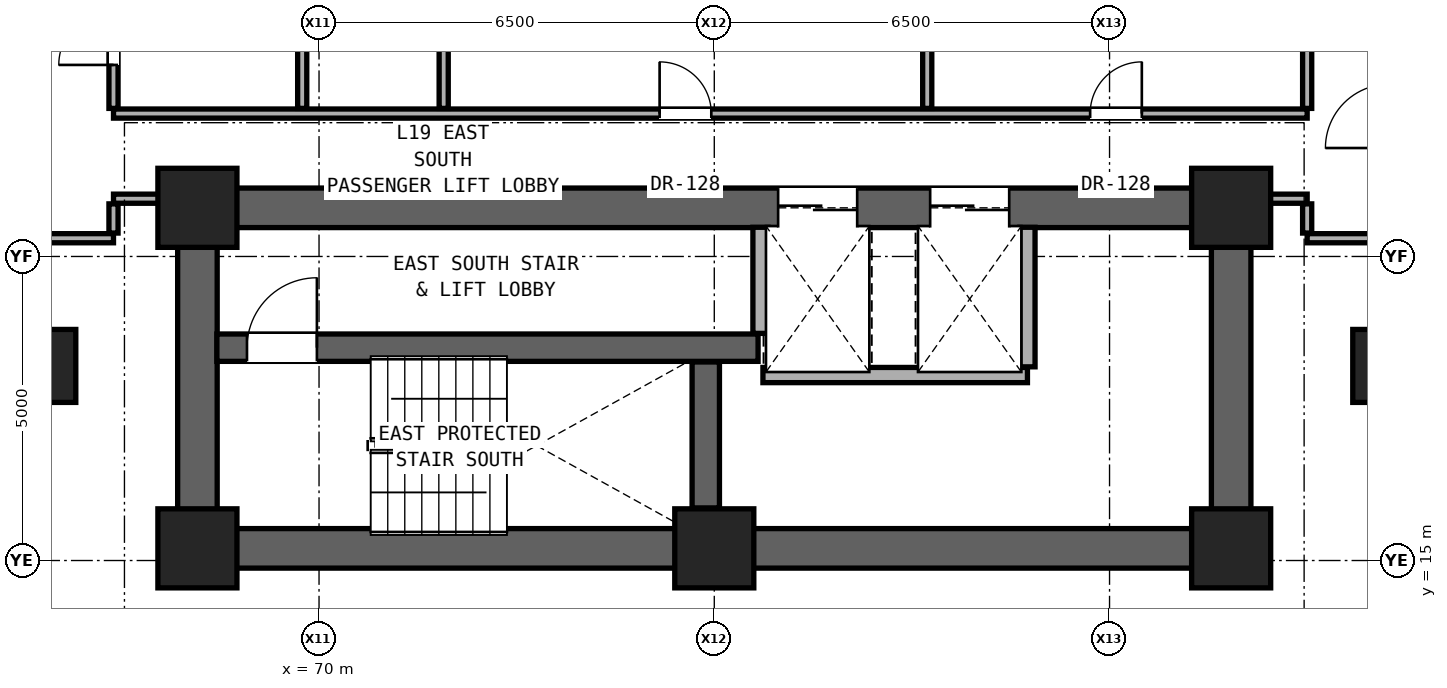
"""IFC4 building model, lengths in metres.
Left out: names, types, materials, properties, quantities, classifications, styles, units other than length and angle.
Written with IfcOpenShell. Run it as: python <this file> out.ifc"""

import sys

from ifc_helpers import new_model, si_unit, direction, frame, frame_2d, origin, origin_2d, place, context, subcontext, project, spatial, rectangle, extrude, element, fill, save


model = new_model("IFC4")
c1 = context("Model", 3, precision=1e-05, world=origin(), true_north=direction((0.0, 1.0)))
c2 = subcontext(c1, "Body", "Model", "MODEL_VIEW")
j1 = project(units=[si_unit("LENGTHUNIT", "METRE"), si_unit("PLANEANGLEUNIT", "RADIAN")], contexts=[c1])
p1 = place(None, origin())
s1 = spatial("IfcSite", under=j1, at=p1, CompositionType="ELEMENT")
p2 = place(p1, origin())
s2 = spatial("IfcBuilding", under=s1, at=p2, CompositionType="ELEMENT")
p3 = place(p2, frame((0.0, 0.0, 68.6)))
s3 = spatial("IfcBuildingStorey", under=s2, at=p3, CompositionType="ELEMENT", Elevation=68.6)
for number, where, z_axis, x_axis in (
    (1, (68.0, 15.2, 0.0), (0.0, 0.0, 1.0), (1.0, 0.0, 0.0)),
    (2, (76.5, 15.2, 0.0), (0.0, 0.0, 1.0), (1.0, 0.0, 0.0)),
    (3, (85.0, 15.2, 0.0), (0.0, 0.0, 1.0), (1.0, 0.0, 0.0)),
    (4, (68.0, 20.8, 0.0), (0.0, 0.0, 1.0), (1.0, 0.0, 0.0)),
    (5, (85.0, 20.8, 0.0), (0.0, 0.0, 1.0), (1.0, 0.0, 0.0)),
):
    element("IfcColumn", number, at=place(p3, frame(where, z_axis=z_axis, x_axis=x_axis)), inside=s3, PredefinedType="COLUMN", context=c2, shape_type="SweptSolid", body=[
        extrude(rectangle(XDim=1.3, YDim=1.3, at=origin_2d()), origin(), (0.0, 0.0, 1.0), 3.3),
    ])
for number, where, z_axis, x_axis in (
    (6, (65.6, 18.2, 0.0), (0.0, 0.0, 1.0), (1.0, 0.0, 0.0)),
    (7, (87.4, 18.2, 0.0), (0.0, 0.0, 1.0), (1.0, 0.0, 0.0)),
):
    element("IfcColumn", number, at=place(p3, frame(where, z_axis=z_axis, x_axis=x_axis)), inside=s3, PredefinedType="PILASTER", context=c2, shape_type="SweptSolid", body=[
        extrude(rectangle(XDim=0.8, YDim=1.2, at=origin_2d()), origin(), (0.0, 0.0, 1.0), 3.3),
    ])
p4 = place(p3, frame((68.0, 15.2, 0.0), z_axis=(0.0, 0.0, 1.0), x_axis=(1.0, 0.0, 0.0)))
e8 = element("IfcWall", 8, at=p4, inside=s3, PredefinedType="SHEAR", context=c2, shape_type="SweptSolid", body=[
    extrude(rectangle(XDim=17.0, YDim=0.65, at=frame_2d((8.5, 0.0))), origin(), (0.0, 0.0, 1.0), 3.06),
])
for number, where, z_axis, x_axis in (
    (9, (68.0, 15.2, 0.0), (0.0, 0.0, 1.0), (0.0, 1.0, 0.0)),
    (10, (85.0, 15.2, 0.0), (0.0, 0.0, 1.0), (0.0, 1.0, 0.0)),
):
    element("IfcWall", number, at=place(p3, frame(where, z_axis=z_axis, x_axis=x_axis)), inside=s3, PredefinedType="SHEAR", context=c2, shape_type="SweptSolid", body=[
        extrude(rectangle(XDim=5.6, YDim=0.65, at=frame_2d((2.8, 0.0))), origin(), (0.0, 0.0, 1.0), 3.06),
    ])
p5 = place(p3, frame((68.0, 20.8, 0.0), z_axis=(0.0, 0.0, 1.0), x_axis=(1.0, 0.0, 0.0)))
e11 = element("IfcWall", 11, at=p5, inside=s3, PredefinedType="SHEAR", context=c2, shape_type="SweptSolid", body=[
    extrude(rectangle(XDim=17.0, YDim=0.65, at=frame_2d((8.5, 0.0))), origin(), (0.0, 0.0, 1.0), 3.06),
])
p6 = place(p5, frame((9.55, 0.0, 0.0)))
e12 = element("IfcOpeningElement", 12, at=p6, cuts=e11, PredefinedType="OPENING", context=c2, shape_type="SweptSolid", body=[
    extrude(rectangle(XDim=1.3, YDim=2.3, at=frame_2d((0.65, 1.15))), frame((0.0, 0.335, 0.0), z_axis=(0.0, -1.0, 0.0), x_axis=(1.0, 0.0, 0.0)), (0.0, 0.0, 1.0), 0.67),
])
p7 = place(p5, frame((12.05, 0.0, 0.0)))
e13 = element("IfcOpeningElement", 13, at=p7, cuts=e11, PredefinedType="OPENING", context=c2, shape_type="SweptSolid", body=[
    extrude(rectangle(XDim=1.3, YDim=2.3, at=frame_2d((0.65, 1.15))), frame((0.0, 0.335, 0.0), z_axis=(0.0, -1.0, 0.0), x_axis=(1.0, 0.0, 0.0)), (0.0, 0.0, 1.0), 0.67),
])
p8 = place(p3, frame((77.3, 18.05, 0.0), z_axis=(0.0, 0.0, 1.0), x_axis=(1.0, 0.0, 0.0)))
e14 = element("IfcWall", 14, at=p8, inside=s3, PredefinedType="SOLIDWALL", context=c2, shape_type="SweptSolid", body=[
    extrude(rectangle(XDim=4.35, YDim=0.25, at=frame_2d((2.175, 0.0))), origin(), (0.0, 0.0, 1.0), 3.06),
])
p9 = place(p3, frame((68.32, 18.5, 0.0), z_axis=(0.0, 0.0, 1.0), x_axis=(1.0, 0.0, 0.0)))
e15 = element("IfcWall", 15, at=p9, inside=s3, PredefinedType="SHEAR", context=c2, shape_type="SweptSolid", body=[
    extrude(rectangle(XDim=8.9, YDim=0.45, at=frame_2d((4.45, 0.0))), origin(), (0.0, 0.0, 1.0), 3.06),
])
p10 = place(p9, frame((0.495, 0.0, 0.0)))
e16 = element("IfcOpeningElement", 16, at=p10, cuts=e15, PredefinedType="OPENING", context=c2, shape_type="SweptSolid", body=[
    extrude(rectangle(XDim=1.15, YDim=2.2, at=frame_2d((0.575, 1.1))), frame((0.0, 0.235, 0.0), z_axis=(0.0, -1.0, 0.0), x_axis=(1.0, 0.0, 0.0)), (0.0, 0.0, 1.0), 0.47),
])
p11 = place(p3, frame((65.25, 20.3, 0.0), z_axis=(0.0, 0.0, 1.0), x_axis=(1.0, 0.0, 0.0)))
e17 = element("IfcWall", 17, at=p11, inside=s3, PredefinedType="PARTITIONING", context=c2, shape_type="SweptSolid", body=[
    extrude(rectangle(XDim=1.37, YDim=0.15, at=frame_2d((0.685, 0.0))), origin(), (0.0, 0.0, 1.0), 3.06),
])
p12 = place(p3, frame((86.25, 20.3, 0.0), z_axis=(0.0, 0.0, 1.0), x_axis=(1.0, 0.0, 0.0)))
e18 = element("IfcWall", 18, at=p12, inside=s3, PredefinedType="PARTITIONING", context=c2, shape_type="SweptSolid", body=[
    extrude(rectangle(XDim=1.35, YDim=0.15, at=frame_2d((0.675, 0.0))), origin(), (0.0, 0.0, 1.0), 3.06),
])
p13 = place(p3, frame((66.62, 20.95, 0.0), z_axis=(0.0, 0.0, 1.0), x_axis=(1.0, 0.0, 0.0)))
e19 = element("IfcWall", 19, at=p13, inside=s3, PredefinedType="PARTITIONING", context=c2, shape_type="SweptSolid", body=[
    extrude(rectangle(XDim=1.06, YDim=0.15, at=frame_2d((0.53, 0.0))), origin(), (0.0, 0.0, 1.0), 2.452),
])
p14 = place(p3, frame((85.32, 20.95, 0.0), z_axis=(0.0, 0.0, 1.0), x_axis=(1.0, 0.0, 0.0)))
e20 = element("IfcWall", 20, at=p14, inside=s3, PredefinedType="PARTITIONING", context=c2, shape_type="SweptSolid", body=[
    extrude(rectangle(XDim=0.93, YDim=0.15, at=frame_2d((0.465, 0.0))), origin(), (0.0, 0.0, 1.0), 2.452),
])
p15 = place(p3, frame((66.62, 22.35, 0.0), z_axis=(0.0, 0.0, 1.0), x_axis=(1.0, 0.0, 0.0)))
e21 = element("IfcWall", 21, at=p15, inside=s3, PredefinedType="PARTITIONING", context=c2, shape_type="SweptSolid", body=[
    extrude(rectangle(XDim=19.63, YDim=0.15, at=frame_2d((9.815, 0.0))), origin(), (0.0, 0.0, 1.0), 2.125),
])
p16 = place(p15, frame((8.981, 0.0, 0.0)))
e22 = element("IfcOpeningElement", 22, at=p16, cuts=e21, PredefinedType="OPENING", context=c2, shape_type="SweptSolid", body=[
    extrude(rectangle(XDim=0.85, YDim=2.01, at=frame_2d((0.425, 1.005))), frame((0.0, 0.085, 0.0), z_axis=(0.0, -1.0, 0.0), x_axis=(1.0, 0.0, 0.0)), (0.0, 0.0, 1.0), 0.17),
])
p17 = place(p15, frame((16.061, 0.0, 0.0)))
e23 = element("IfcOpeningElement", 23, at=p17, cuts=e21, PredefinedType="OPENING", context=c2, shape_type="SweptSolid", body=[
    extrude(rectangle(XDim=0.85, YDim=2.01, at=frame_2d((0.425, 1.005))), frame((0.0, 0.085, 0.0), z_axis=(0.0, -1.0, 0.0), x_axis=(1.0, 0.0, 0.0)), (0.0, 0.0, 1.0), 0.17),
])
p18 = place(p3, frame((66.62, 20.385, 0.0), z_axis=(0.0, 0.0, 1.0), x_axis=(0.0, 1.0, 0.0)))
e24 = element("IfcWall", 24, at=p18, inside=s3, PredefinedType="PARTITIONING", context=c2, shape_type="SweptSolid", body=[
    extrude(rectangle(XDim=0.48, YDim=0.15, at=frame_2d((0.24, 0.0))), origin(), (0.0, 0.0, 1.0), 2.452),
])
p19 = place(p3, frame((66.62, 22.435, 0.0), z_axis=(0.0, 0.0, 1.0), x_axis=(0.0, 1.0, 0.0)))
e25 = element("IfcWall", 25, at=p19, inside=s3, PredefinedType="PARTITIONING", context=c2, shape_type="SweptSolid", body=[
    extrude(rectangle(XDim=2.33, YDim=0.15, at=frame_2d((1.165, 0.0))), origin(), (0.0, 0.0, 1.0), 3.06),
])
p20 = place(p19, frame((0.715, 0.0, 0.0)))
e26 = element("IfcOpeningElement", 26, at=p20, cuts=e25, PredefinedType="OPENING", context=c2, shape_type="SweptSolid", body=[
    extrude(rectangle(XDim=0.9, YDim=2.1, at=frame_2d((0.45, 1.05))), frame((0.0, 0.085, 0.0), z_axis=(0.0, -1.0, 0.0), x_axis=(1.0, 0.0, 0.0)), (0.0, 0.0, 1.0), 0.17),
])
p21 = place(p3, frame((69.723, 22.435, 0.0), z_axis=(0.0, 0.0, 1.0), x_axis=(0.0, 1.0, 0.0)))
e27 = element("IfcWall", 27, at=p21, inside=s3, PredefinedType="PARTITIONING", context=c2, shape_type="SweptSolid", body=[
    extrude(rectangle(XDim=2.33, YDim=0.15, at=frame_2d((1.165, 0.0))), origin(), (0.0, 0.0, 1.0), 3.06),
])
p22 = place(p3, frame((72.05, 22.435, 0.0), z_axis=(0.0, 0.0, 1.0), x_axis=(0.0, 1.0, 0.0)))
e28 = element("IfcWall", 28, at=p22, inside=s3, PredefinedType="PARTITIONING", context=c2, shape_type="SweptSolid", body=[
    extrude(rectangle(XDim=3.565, YDim=0.15, at=frame_2d((1.782, 0.0))), origin(), (0.0, 0.0, 1.0), 2.589),
])
p23 = place(p3, frame((76.36, 15.865, 0.0), z_axis=(0.0, 0.0, 1.0), x_axis=(0.0, 1.0, 0.0)))
e29 = element("IfcWall", 29, at=p23, inside=s3, PredefinedType="SHEAR", context=c2, shape_type="SweptSolid", body=[
    extrude(rectangle(XDim=2.4, YDim=0.45, at=frame_2d((1.2, 0.0))), origin(), (0.0, 0.0, 1.0), 3.06),
])
p24 = place(p3, frame((77.26, 18.735, 0.0), z_axis=(0.0, 0.0, 1.0), x_axis=(0.0, 1.0, 0.0)))
e30 = element("IfcWall", 30, at=p24, inside=s3, PredefinedType="SOLIDWALL", context=c2, shape_type="SweptSolid", body=[
    extrude(rectangle(XDim=1.745, YDim=0.25, at=frame_2d((0.873, 0.0))), origin(), (0.0, 0.0, 1.0), 3.06),
])
p25 = place(p3, frame((80.002, 22.435, 0.0), z_axis=(0.0, 0.0, 1.0), x_axis=(0.0, 1.0, 0.0)))
e31 = element("IfcWall", 31, at=p25, inside=s3, PredefinedType="PARTITIONING", context=c2, shape_type="SweptSolid", body=[
    extrude(rectangle(XDim=3.565, YDim=0.15, at=frame_2d((1.782, 0.0))), origin(), (0.0, 0.0, 1.0), 3.06),
])
p26 = place(p3, frame((81.65, 18.185, 0.0), z_axis=(0.0, 0.0, 1.0), x_axis=(0.0, 1.0, 0.0)))
e32 = element("IfcWall", 32, at=p26, inside=s3, PredefinedType="SOLIDWALL", context=c2, shape_type="SweptSolid", body=[
    extrude(rectangle(XDim=2.295, YDim=0.25, at=frame_2d((1.147, 0.0))), origin(), (0.0, 0.0, 1.0), 3.06),
])
p27 = place(p3, frame((86.25, 20.385, 0.0), z_axis=(0.0, 0.0, 1.0), x_axis=(0.0, 1.0, 0.0)))
e33 = element("IfcWall", 33, at=p27, inside=s3, PredefinedType="PARTITIONING", context=c2, shape_type="SweptSolid", body=[
    extrude(rectangle(XDim=0.48, YDim=0.15, at=frame_2d((0.24, 0.0))), origin(), (0.0, 0.0, 1.0), 2.452),
])
p28 = place(p3, frame((86.25, 22.435, 0.0), z_axis=(0.0, 0.0, 1.0), x_axis=(0.0, 1.0, 0.0)))
e34 = element("IfcWall", 34, at=p28, inside=s3, PredefinedType="PARTITIONING", context=c2, shape_type="SweptSolid", body=[
    extrude(rectangle(XDim=3.565, YDim=0.15, at=frame_2d((1.782, 0.0))), origin(), (0.0, 0.0, 1.0), 3.06),
])
p29 = place(p10, origin())
e35 = element("IfcDoor", 35, at=p29, inside=s3, OperationType="SINGLE_SWING_RIGHT", PredefinedType="DOOR", context=c2, shape_type="SweptSolid", body=[
    extrude(rectangle(XDim=1.15, YDim=2.2, at=frame_2d((0.575, 1.1))), frame((0.0, 0.025, 0.0), z_axis=(0.0, -1.0, 0.0), x_axis=(1.0, 0.0, 0.0)), (0.0, 0.0, 1.0), 0.05),
])
fill(e16, e35)
p30 = place(p20, origin())
e36 = element("IfcDoor", 36, at=p30, inside=s3, OperationType="SINGLE_SWING_LEFT", PredefinedType="DOOR", context=c2, shape_type="SweptSolid", body=[
    extrude(rectangle(XDim=0.9, YDim=2.1, at=frame_2d((0.45, 1.05))), frame((0.0, 0.025, 0.0), z_axis=(0.0, -1.0, 0.0), x_axis=(1.0, 0.0, 0.0)), (0.0, 0.0, 1.0), 0.05),
])
fill(e26, e36)
p31 = place(p16, origin())
e37 = element("IfcDoor", 37, at=p31, inside=s3, OperationType="SINGLE_SWING_LEFT", PredefinedType="DOOR", context=c2, shape_type="SweptSolid", body=[
    extrude(rectangle(XDim=0.85, YDim=2.01, at=frame_2d((0.425, 1.005))), frame((0.0, 0.025, 0.0), z_axis=(0.0, -1.0, 0.0), x_axis=(1.0, 0.0, 0.0)), (0.0, 0.0, 1.0), 0.05),
])
fill(e22, e37)
p32 = place(p17, origin())
e38 = element("IfcDoor", 38, at=p32, inside=s3, OperationType="SINGLE_SWING_RIGHT", PredefinedType="DOOR", context=c2, shape_type="SweptSolid", body=[
    extrude(rectangle(XDim=0.85, YDim=2.01, at=frame_2d((0.425, 1.005))), frame((0.0, 0.025, 0.0), z_axis=(0.0, -1.0, 0.0), x_axis=(1.0, 0.0, 0.0)), (0.0, 0.0, 1.0), 0.05),
])
fill(e23, e38)
p33 = place(p6, origin())
e39 = element("IfcDoor", 39, at=p33, inside=s3, OperationType="DOUBLE_DOOR_SLIDING", PredefinedType="DOOR", context=c2, shape_type="SweptSolid", body=[
    extrude(rectangle(XDim=1.3, YDim=2.3, at=frame_2d((0.65, 1.15))), frame((0.0, 0.025, 0.0), z_axis=(0.0, -1.0, 0.0), x_axis=(1.0, 0.0, 0.0)), (0.0, 0.0, 1.0), 0.05),
])
fill(e12, e39)
p34 = place(p7, origin())
e40 = element("IfcDoor", 40, at=p34, inside=s3, OperationType="DOUBLE_DOOR_SLIDING", PredefinedType="DOOR", context=c2, shape_type="SweptSolid", body=[
    extrude(rectangle(XDim=1.3, YDim=2.3, at=frame_2d((0.65, 1.15))), frame((0.0, 0.025, 0.0), z_axis=(0.0, -1.0, 0.0), x_axis=(1.0, 0.0, 0.0)), (0.0, 0.0, 1.0), 0.05),
])
fill(e13, e40)
save(model, sys.argv[1])
